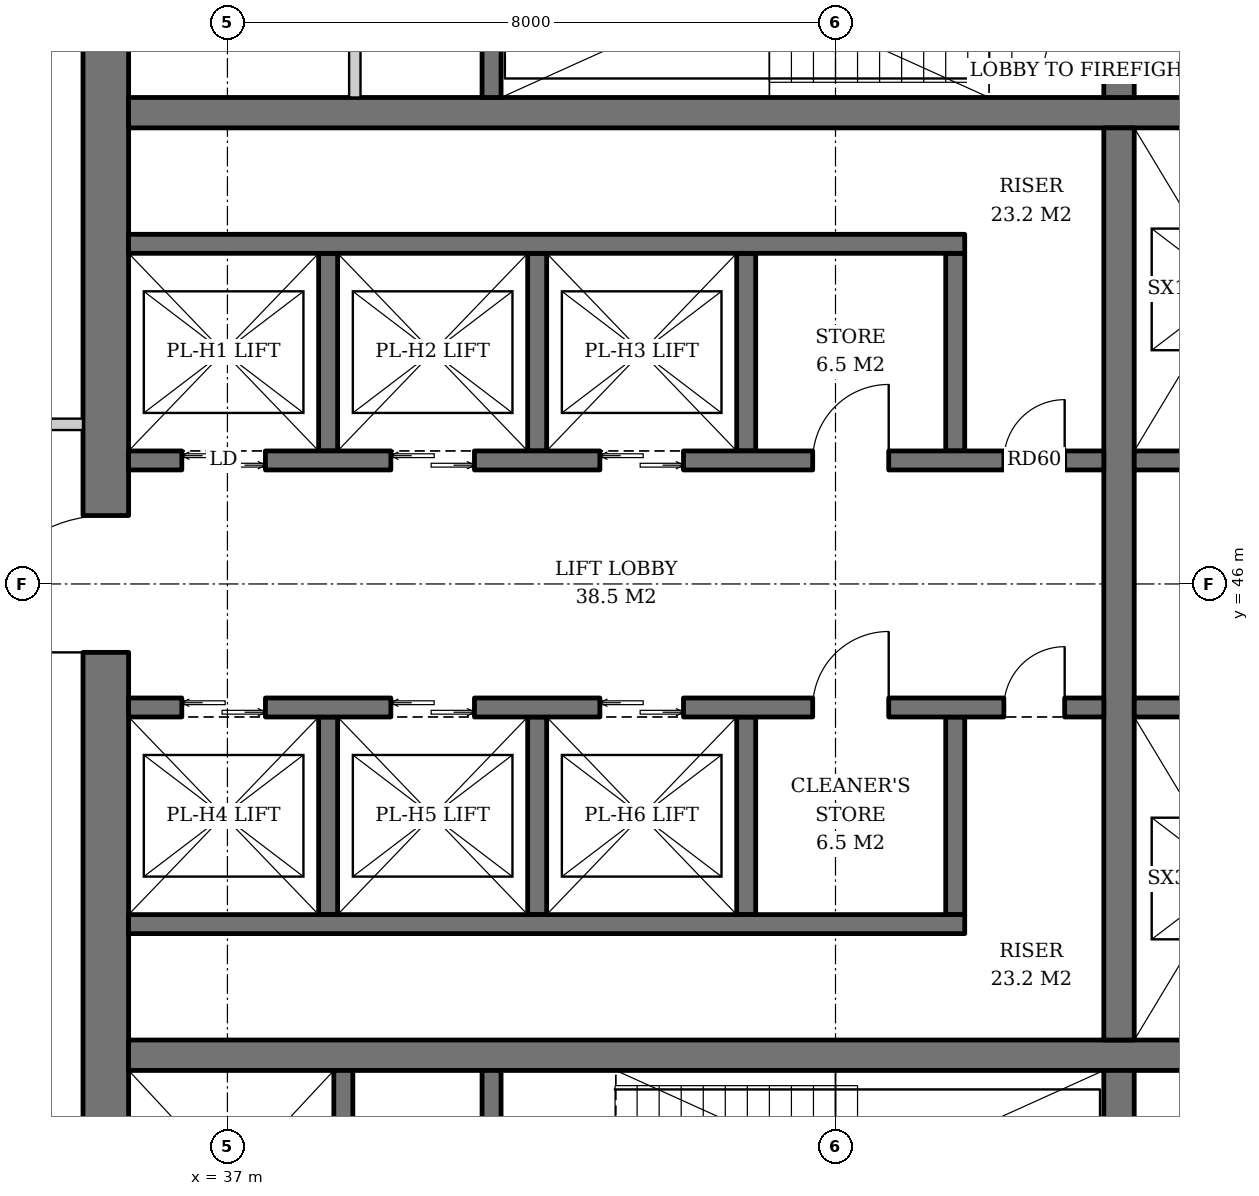
"""IFC4 building model, lengths in metres.
Left out: names, types, materials, properties, quantities, classifications, styles, units other than length and angle.
Written with IfcOpenShell. Run it as: python <this file> out.ifc"""

import sys

from ifc_helpers import new_model, si_unit, direction, frame, frame_2d, origin, place, context, subcontext, project, spatial, rectangle, extrude, element, fill, save


model = new_model("IFC4")
c1 = context("Model", 3, precision=1e-05, world=origin(), true_north=direction((0.0, 1.0)))
c2 = subcontext(c1, "Body", "Model", "MODEL_VIEW")
j1 = project(units=[si_unit("LENGTHUNIT", "METRE"), si_unit("PLANEANGLEUNIT", "RADIAN")], contexts=[c1])
p1 = place(None, origin())
s1 = spatial("IfcSite", under=j1, at=p1, CompositionType="ELEMENT")
p2 = place(p1, origin())
s2 = spatial("IfcBuilding", under=s1, at=p2, CompositionType="ELEMENT")
p3 = place(p2, frame((0.0, 0.0, 184.4)))
s3 = spatial("IfcBuildingStorey", under=s2, at=p3, CompositionType="ELEMENT", Elevation=184.4)
p4 = place(p3, frame((35.4, 36.7, 0.0), z_axis=(0.0, 0.0, 1.0), x_axis=(0.0, 1.0, 0.0)))
e1 = element("IfcWall", 1, at=p4, inside=s3, PredefinedType="SHEAR", context=c2, shape_type="SweptSolid", body=[
    extrude(rectangle(XDim=18.6, YDim=0.6, at=frame_2d((9.3, 0.0))), origin(), (0.0, 0.0, 1.0), 3.8),
])
p5 = place(p4, frame((8.4, 0.0, 0.0)))
e2 = element("IfcOpeningElement", 2, at=p5, cuts=e1, PredefinedType="OPENING", context=c2, shape_type="SweptSolid", body=[
    extrude(rectangle(XDim=1.8, YDim=2.4, at=frame_2d((0.9, 1.2))), frame((0.0, 0.31, 0.0), z_axis=(0.0, -1.0, 0.0), x_axis=(1.0, 0.0, 0.0)), (0.0, 0.0, 1.0), 0.62),
])
for number, where, z_axis, x_axis in (
    (3, (35.7, 39.8, 0.0), (0.0, 0.0, 1.0), (1.0, 0.0, 0.0)),
    (4, (35.7, 52.2, 0.0), (0.0, 0.0, 1.0), (1.0, 0.0, 0.0)),
):
    element("IfcWall", number, at=place(p3, frame(where, z_axis=z_axis, x_axis=x_axis)), inside=s3, PredefinedType="SHEAR", context=c2, shape_type="SweptSolid", body=[
        extrude(rectangle(XDim=18.6, YDim=0.4, at=frame_2d((9.3, 0.0))), origin(), (0.0, 0.0, 1.0), 3.8),
    ])
p6 = place(p3, frame((48.73, 36.7, 0.0), z_axis=(0.0, 0.0, 1.0), x_axis=(0.0, 1.0, 0.0)))
e5 = element("IfcWall", 5, at=p6, inside=s3, PredefinedType="SHEAR", context=c2, shape_type="SweptSolid", body=[
    extrude(rectangle(XDim=2.9, YDim=0.4, at=frame_2d((1.45, 0.0))), origin(), (0.0, 0.0, 1.0), 3.8),
])
p7 = place(p3, frame((48.73, 40.0, 0.0), z_axis=(0.0, 0.0, 1.0), x_axis=(0.0, 1.0, 0.0)))
e6 = element("IfcWall", 6, at=p7, inside=s3, PredefinedType="SHEAR", context=c2, shape_type="SweptSolid", body=[
    extrude(rectangle(XDim=12.0, YDim=0.4, at=frame_2d((6.0, 0.0))), origin(), (0.0, 0.0, 1.0), 3.8),
])
p8 = place(p3, frame((48.73, 52.4, 0.0), z_axis=(0.0, 0.0, 1.0), x_axis=(0.0, 1.0, 0.0)))
e7 = element("IfcWall", 7, at=p8, inside=s3, PredefinedType="SHEAR", context=c2, shape_type="SweptSolid", body=[
    extrude(rectangle(XDim=2.9, YDim=0.4, at=frame_2d((1.45, 0.0))), origin(), (0.0, 0.0, 1.0), 3.8),
])
p9 = place(p8, frame((0.3, 0.0, 0.0)))
e8 = element("IfcOpeningElement", 8, at=p9, cuts=e7, PredefinedType="OPENING", context=c2, shape_type="SweptSolid", body=[
    extrude(rectangle(XDim=1.0, YDim=2.1, at=frame_2d((0.5, 1.05))), frame((0.0, 0.21, 0.0), z_axis=(0.0, -1.0, 0.0), x_axis=(1.0, 0.0, 0.0)), (0.0, 0.0, 1.0), 0.42),
])
p10 = place(p3, frame((38.525, 36.7, 0.0), z_axis=(0.0, 0.0, 1.0), x_axis=(0.0, 1.0, 0.0)))
e9 = element("IfcWall", 9, at=p10, inside=s3, PredefinedType="SHEAR", context=c2, shape_type="SweptSolid", body=[
    extrude(rectangle(XDim=2.9, YDim=0.25, at=frame_2d((1.45, 0.0))), origin(), (0.0, 0.0, 1.0), 3.8),
])
p11 = place(p10, frame((0.8, 0.0, 0.0)))
e10 = element("IfcOpeningElement", 10, at=p11, cuts=e9, PredefinedType="OPENING", context=c2, shape_type="SweptSolid", body=[
    extrude(rectangle(XDim=1.3, YDim=2.2, at=frame_2d((0.65, 1.1))), frame((0.0, 0.135, 0.0), z_axis=(0.0, -1.0, 0.0), x_axis=(1.0, 0.0, 0.0)), (0.0, 0.0, 1.0), 0.27),
])
p12 = place(p3, frame((40.475, 36.7, 0.0), z_axis=(0.0, 0.0, 1.0), x_axis=(0.0, 1.0, 0.0)))
e11 = element("IfcWall", 11, at=p12, inside=s3, PredefinedType="SHEAR", context=c2, shape_type="SweptSolid", body=[
    extrude(rectangle(XDim=2.9, YDim=0.25, at=frame_2d((1.45, 0.0))), origin(), (0.0, 0.0, 1.0), 3.8),
])
p13 = place(p12, frame((0.75, 0.0, 0.0)))
e12 = element("IfcOpeningElement", 12, at=p13, cuts=e11, PredefinedType="OPENING", context=c2, shape_type="SweptSolid", body=[
    extrude(rectangle(XDim=1.2, YDim=2.1, at=frame_2d((0.6, 1.05))), frame((0.0, 0.135, 0.0), z_axis=(0.0, -1.0, 0.0), x_axis=(1.0, 0.0, 0.0)), (0.0, 0.0, 1.0), 0.27),
])
p14 = place(p3, frame((40.475, 52.4, 0.0), z_axis=(0.0, 0.0, 1.0), x_axis=(0.0, 1.0, 0.0)))
e13 = element("IfcWall", 13, at=p14, inside=s3, PredefinedType="SHEAR", context=c2, shape_type="SweptSolid", body=[
    extrude(rectangle(XDim=2.9, YDim=0.25, at=frame_2d((1.45, 0.0))), origin(), (0.0, 0.0, 1.0), 3.8),
])
for number, where, z_axis, x_axis in (
    (14, (38.325, 47.75, 0.0), (0.0, 0.0, 1.0), (0.0, 1.0, 0.0)),
    (15, (41.075, 47.75, 0.0), (0.0, 0.0, 1.0), (0.0, 1.0, 0.0)),
    (16, (43.825, 47.75, 0.0), (0.0, 0.0, 1.0), (0.0, 1.0, 0.0)),
    (17, (46.575, 47.75, 0.0), (0.0, 0.0, 1.0), (0.0, 1.0, 0.0)),
):
    element("IfcWall", number, at=place(p3, frame(where, z_axis=z_axis, x_axis=x_axis)), inside=s3, PredefinedType="SHEAR", context=c2, shape_type="SweptSolid", body=[
        extrude(rectangle(XDim=2.6, YDim=0.25, at=frame_2d((1.3, 0.0))), origin(), (0.0, 0.0, 1.0), 3.8),
    ])
p15 = place(p3, frame((35.7, 50.475, 0.0), z_axis=(0.0, 0.0, 1.0), x_axis=(1.0, 0.0, 0.0)))
e18 = element("IfcWall", 18, at=p15, inside=s3, PredefinedType="SHEAR", context=c2, shape_type="SweptSolid", body=[
    extrude(rectangle(XDim=11.0, YDim=0.25, at=frame_2d((5.5, 0.0))), origin(), (0.0, 0.0, 1.0), 3.8),
])
p16 = place(p3, frame((35.7, 47.625, 0.0), z_axis=(0.0, 0.0, 1.0), x_axis=(1.0, 0.0, 0.0)))
e19 = element("IfcWall", 19, at=p16, inside=s3, PredefinedType="SHEAR", context=c2, shape_type="SweptSolid", body=[
    extrude(rectangle(XDim=12.83, YDim=0.25, at=frame_2d((6.415, 0.0))), origin(), (0.0, 0.0, 1.0), 3.8),
])
p17 = place(p16, frame((0.7, 0.0, 0.0)))
e20 = element("IfcOpeningElement", 20, at=p17, cuts=e19, PredefinedType="OPENING", context=c2, shape_type="SweptSolid", body=[
    extrude(rectangle(XDim=1.1, YDim=2.2, at=frame_2d((0.55, 1.1))), frame((0.0, 0.135, 0.0), z_axis=(0.0, -1.0, 0.0), x_axis=(1.0, 0.0, 0.0)), (0.0, 0.0, 1.0), 0.27),
])
p18 = place(p16, frame((3.45, 0.0, 0.0)))
e21 = element("IfcOpeningElement", 21, at=p18, cuts=e19, PredefinedType="OPENING", context=c2, shape_type="SweptSolid", body=[
    extrude(rectangle(XDim=1.1, YDim=2.2, at=frame_2d((0.55, 1.1))), frame((0.0, 0.135, 0.0), z_axis=(0.0, -1.0, 0.0), x_axis=(1.0, 0.0, 0.0)), (0.0, 0.0, 1.0), 0.27),
])
p19 = place(p16, frame((6.2, 0.0, 0.0)))
e22 = element("IfcOpeningElement", 22, at=p19, cuts=e19, PredefinedType="OPENING", context=c2, shape_type="SweptSolid", body=[
    extrude(rectangle(XDim=1.1, YDim=2.2, at=frame_2d((0.55, 1.1))), frame((0.0, 0.135, 0.0), z_axis=(0.0, -1.0, 0.0), x_axis=(1.0, 0.0, 0.0)), (0.0, 0.0, 1.0), 0.27),
])
p20 = place(p16, frame((9.0, 0.0, 0.0)))
e23 = element("IfcOpeningElement", 23, at=p20, cuts=e19, PredefinedType="OPENING", context=c2, shape_type="SweptSolid", body=[
    extrude(rectangle(XDim=1.0, YDim=2.1, at=frame_2d((0.5, 1.05))), frame((0.0, 0.135, 0.0), z_axis=(0.0, -1.0, 0.0), x_axis=(1.0, 0.0, 0.0)), (0.0, 0.0, 1.0), 0.27),
])
p21 = place(p16, frame((11.515, 0.0, 0.0)))
e24 = element("IfcOpeningElement", 24, at=p21, cuts=e19, PredefinedType="OPENING", context=c2, shape_type="SweptSolid", body=[
    extrude(rectangle(XDim=0.8, YDim=2.0, at=frame_2d((0.4, 1.0))), frame((0.0, 0.135, 0.0), z_axis=(0.0, -1.0, 0.0), x_axis=(1.0, 0.0, 0.0)), (0.0, 0.0, 1.0), 0.27),
])
for number, where, z_axis, x_axis in (
    (25, (38.325, 44.25, 0.0), (0.0, 0.0, 1.0), (0.0, -1.0, 0.0)),
    (26, (41.075, 44.25, 0.0), (0.0, 0.0, 1.0), (0.0, -1.0, 0.0)),
    (27, (43.825, 44.25, 0.0), (0.0, 0.0, 1.0), (0.0, -1.0, 0.0)),
    (28, (46.575, 44.25, 0.0), (0.0, 0.0, 1.0), (0.0, -1.0, 0.0)),
):
    element("IfcWall", number, at=place(p3, frame(where, z_axis=z_axis, x_axis=x_axis)), inside=s3, PredefinedType="SHEAR", context=c2, shape_type="SweptSolid", body=[
        extrude(rectangle(XDim=2.6, YDim=0.25, at=frame_2d((1.3, 0.0))), origin(), (0.0, 0.0, 1.0), 3.8),
    ])
p22 = place(p3, frame((35.7, 41.525, 0.0), z_axis=(0.0, 0.0, 1.0), x_axis=(1.0, 0.0, 0.0)))
e29 = element("IfcWall", 29, at=p22, inside=s3, PredefinedType="SHEAR", context=c2, shape_type="SweptSolid", body=[
    extrude(rectangle(XDim=11.0, YDim=0.25, at=frame_2d((5.5, 0.0))), origin(), (0.0, 0.0, 1.0), 3.8),
])
p23 = place(p3, frame((35.7, 44.375, 0.0), z_axis=(0.0, 0.0, 1.0), x_axis=(1.0, 0.0, 0.0)))
e30 = element("IfcWall", 30, at=p23, inside=s3, PredefinedType="SHEAR", context=c2, shape_type="SweptSolid", body=[
    extrude(rectangle(XDim=12.83, YDim=0.25, at=frame_2d((6.415, 0.0))), origin(), (0.0, 0.0, 1.0), 3.8),
])
p24 = place(p23, frame((0.7, 0.0, 0.0)))
e31 = element("IfcOpeningElement", 31, at=p24, cuts=e30, PredefinedType="OPENING", context=c2, shape_type="SweptSolid", body=[
    extrude(rectangle(XDim=1.1, YDim=2.2, at=frame_2d((0.55, 1.1))), frame((0.0, 0.135, 0.0), z_axis=(0.0, -1.0, 0.0), x_axis=(1.0, 0.0, 0.0)), (0.0, 0.0, 1.0), 0.27),
])
p25 = place(p23, frame((3.45, 0.0, 0.0)))
e32 = element("IfcOpeningElement", 32, at=p25, cuts=e30, PredefinedType="OPENING", context=c2, shape_type="SweptSolid", body=[
    extrude(rectangle(XDim=1.1, YDim=2.2, at=frame_2d((0.55, 1.1))), frame((0.0, 0.135, 0.0), z_axis=(0.0, -1.0, 0.0), x_axis=(1.0, 0.0, 0.0)), (0.0, 0.0, 1.0), 0.27),
])
p26 = place(p23, frame((6.2, 0.0, 0.0)))
e33 = element("IfcOpeningElement", 33, at=p26, cuts=e30, PredefinedType="OPENING", context=c2, shape_type="SweptSolid", body=[
    extrude(rectangle(XDim=1.1, YDim=2.2, at=frame_2d((0.55, 1.1))), frame((0.0, 0.135, 0.0), z_axis=(0.0, -1.0, 0.0), x_axis=(1.0, 0.0, 0.0)), (0.0, 0.0, 1.0), 0.27),
])
p27 = place(p23, frame((9.0, 0.0, 0.0)))
e34 = element("IfcOpeningElement", 34, at=p27, cuts=e30, PredefinedType="OPENING", context=c2, shape_type="SweptSolid", body=[
    extrude(rectangle(XDim=1.0, YDim=2.1, at=frame_2d((0.5, 1.05))), frame((0.0, 0.135, 0.0), z_axis=(0.0, -1.0, 0.0), x_axis=(1.0, 0.0, 0.0)), (0.0, 0.0, 1.0), 0.27),
])
p28 = place(p23, frame((11.515, 0.0, 0.0)))
e35 = element("IfcOpeningElement", 35, at=p28, cuts=e30, PredefinedType="OPENING", context=c2, shape_type="SweptSolid", body=[
    extrude(rectangle(XDim=0.8, YDim=2.0, at=frame_2d((0.4, 1.0))), frame((0.0, 0.135, 0.0), z_axis=(0.0, -1.0, 0.0), x_axis=(1.0, 0.0, 0.0)), (0.0, 0.0, 1.0), 0.27),
])
for number, where, z_axis, x_axis in (
    (36, (48.93, 47.625, 0.0), (0.0, 0.0, 1.0), (1.0, 0.0, 0.0)),
    (37, (48.93, 44.375, 0.0), (0.0, 0.0, 1.0), (1.0, 0.0, 0.0)),
):
    element("IfcWall", number, at=place(p3, frame(where, z_axis=z_axis, x_axis=x_axis)), inside=s3, PredefinedType="SHEAR", context=c2, shape_type="SweptSolid", body=[
        extrude(rectangle(XDim=5.37, YDim=0.25, at=frame_2d((2.685, 0.0))), origin(), (0.0, 0.0, 1.0), 3.8),
    ])
p29 = place(p3, frame((38.676, 52.4, 0.0), z_axis=(0.0, 0.0, 1.0), x_axis=(0.0, 1.0, 0.0)))
e38 = element("IfcWall", 38, at=p29, inside=s3, PredefinedType="SOLIDWALL", context=c2, shape_type="SweptSolid", body=[
    extrude(rectangle(XDim=2.9, YDim=0.15, at=frame_2d((1.45, 0.0))), origin(), (0.0, 0.0, 1.0), 3.62),
])
p30 = place(p3, frame((35.1, 48.1, 0.0), z_axis=(0.0, 0.0, 1.0), x_axis=(-1.0, 0.0, 0.0)))
e39 = element("IfcWall", 39, at=p30, inside=s3, PredefinedType="PARTITIONING", context=c2, shape_type="SweptSolid", body=[
    extrude(rectangle(XDim=2.325, YDim=0.15, at=frame_2d((1.163, 0.0))), origin(), (0.0, 0.0, 1.0), 3.62),
])
p31 = place(p17, origin())
e40 = element("IfcDoor", 40, at=p31, inside=s3, OperationType="DOUBLE_DOOR_SLIDING", PredefinedType="DOOR", context=c2, shape_type="SweptSolid", body=[
    extrude(rectangle(XDim=1.1, YDim=2.2, at=frame_2d((0.55, 1.1))), frame((0.0, 0.025, 0.0), z_axis=(0.0, -1.0, 0.0), x_axis=(1.0, 0.0, 0.0)), (0.0, 0.0, 1.0), 0.05),
])
fill(e20, e40)
p32 = place(p18, origin())
e41 = element("IfcDoor", 41, at=p32, inside=s3, OperationType="DOUBLE_DOOR_SLIDING", PredefinedType="DOOR", context=c2, shape_type="SweptSolid", body=[
    extrude(rectangle(XDim=1.1, YDim=2.2, at=frame_2d((0.55, 1.1))), frame((0.0, 0.025, 0.0), z_axis=(0.0, -1.0, 0.0), x_axis=(1.0, 0.0, 0.0)), (0.0, 0.0, 1.0), 0.05),
])
fill(e21, e41)
p33 = place(p19, origin())
e42 = element("IfcDoor", 42, at=p33, inside=s3, OperationType="DOUBLE_DOOR_SLIDING", PredefinedType="DOOR", context=c2, shape_type="SweptSolid", body=[
    extrude(rectangle(XDim=1.1, YDim=2.2, at=frame_2d((0.55, 1.1))), frame((0.0, 0.025, 0.0), z_axis=(0.0, -1.0, 0.0), x_axis=(1.0, 0.0, 0.0)), (0.0, 0.0, 1.0), 0.05),
])
fill(e22, e42)
p34 = place(p20, origin())
e43 = element("IfcDoor", 43, at=p34, inside=s3, OperationType="SINGLE_SWING_RIGHT", PredefinedType="DOOR", context=c2, shape_type="SweptSolid", body=[
    extrude(rectangle(XDim=1.0, YDim=2.1, at=frame_2d((0.5, 1.05))), frame((0.0, 0.025, 0.0), z_axis=(0.0, -1.0, 0.0), x_axis=(1.0, 0.0, 0.0)), (0.0, 0.0, 1.0), 0.05),
])
fill(e23, e43)
p35 = place(p21, origin())
e44 = element("IfcDoor", 44, at=p35, inside=s3, OperationType="SINGLE_SWING_RIGHT", PredefinedType="DOOR", context=c2, shape_type="SweptSolid", body=[
    extrude(rectangle(XDim=0.8, YDim=2.0, at=frame_2d((0.4, 1.0))), frame((0.0, 0.025, 0.0), z_axis=(0.0, -1.0, 0.0), x_axis=(1.0, 0.0, 0.0)), (0.0, 0.0, 1.0), 0.05),
])
fill(e24, e44)
p36 = place(p24, origin())
e45 = element("IfcDoor", 45, at=p36, inside=s3, OperationType="DOUBLE_DOOR_SLIDING", PredefinedType="DOOR", context=c2, shape_type="SweptSolid", body=[
    extrude(rectangle(XDim=1.1, YDim=2.2, at=frame_2d((0.55, 1.1))), frame((0.0, 0.025, 0.0), z_axis=(0.0, -1.0, 0.0), x_axis=(1.0, 0.0, 0.0)), (0.0, 0.0, 1.0), 0.05),
])
fill(e31, e45)
p37 = place(p25, origin())
e46 = element("IfcDoor", 46, at=p37, inside=s3, OperationType="DOUBLE_DOOR_SLIDING", PredefinedType="DOOR", context=c2, shape_type="SweptSolid", body=[
    extrude(rectangle(XDim=1.1, YDim=2.2, at=frame_2d((0.55, 1.1))), frame((0.0, 0.025, 0.0), z_axis=(0.0, -1.0, 0.0), x_axis=(1.0, 0.0, 0.0)), (0.0, 0.0, 1.0), 0.05),
])
fill(e32, e46)
p38 = place(p26, origin())
e47 = element("IfcDoor", 47, at=p38, inside=s3, OperationType="DOUBLE_DOOR_SLIDING", PredefinedType="DOOR", context=c2, shape_type="SweptSolid", body=[
    extrude(rectangle(XDim=1.1, YDim=2.2, at=frame_2d((0.55, 1.1))), frame((0.0, 0.025, 0.0), z_axis=(0.0, -1.0, 0.0), x_axis=(1.0, 0.0, 0.0)), (0.0, 0.0, 1.0), 0.05),
])
fill(e33, e47)
p39 = place(p27, origin())
e48 = element("IfcDoor", 48, at=p39, inside=s3, OperationType="SINGLE_SWING_RIGHT", PredefinedType="DOOR", context=c2, shape_type="SweptSolid", body=[
    extrude(rectangle(XDim=1.0, YDim=2.1, at=frame_2d((0.5, 1.05))), frame((0.0, 0.025, 0.0), z_axis=(0.0, -1.0, 0.0), x_axis=(1.0, 0.0, 0.0)), (0.0, 0.0, 1.0), 0.05),
])
fill(e34, e48)
p40 = place(p28, origin())
e49 = element("IfcDoor", 49, at=p40, inside=s3, OperationType="SINGLE_SWING_RIGHT", PredefinedType="DOOR", context=c2, shape_type="SweptSolid", body=[
    extrude(rectangle(XDim=0.8, YDim=2.0, at=frame_2d((0.4, 1.0))), frame((0.0, 0.025, 0.0), z_axis=(0.0, -1.0, 0.0), x_axis=(1.0, 0.0, 0.0)), (0.0, 0.0, 1.0), 0.05),
])
fill(e35, e49)
p41 = place(p9, origin())
e50 = element("IfcDoor", 50, at=p41, inside=s3, OperationType="SINGLE_SWING_LEFT", PredefinedType="DOOR", context=c2, shape_type="SweptSolid", body=[
    extrude(rectangle(XDim=1.0, YDim=2.1, at=frame_2d((0.5, 1.05))), frame((0.0, 0.025, 0.0), z_axis=(0.0, -1.0, 0.0), x_axis=(1.0, 0.0, 0.0)), (0.0, 0.0, 1.0), 0.05),
])
fill(e8, e50)
p42 = place(p5, origin())
e51 = element("IfcDoor", 51, at=p42, inside=s3, OperationType="DOUBLE_DOOR_SINGLE_SWING", PredefinedType="DOOR", context=c2, shape_type="SweptSolid", body=[
    extrude(rectangle(XDim=1.8, YDim=2.4, at=frame_2d((0.9, 1.2))), frame((0.0, 0.025, 0.0), z_axis=(0.0, -1.0, 0.0), x_axis=(1.0, 0.0, 0.0)), (0.0, 0.0, 1.0), 0.05),
])
fill(e2, e51)
save(model, sys.argv[1])
